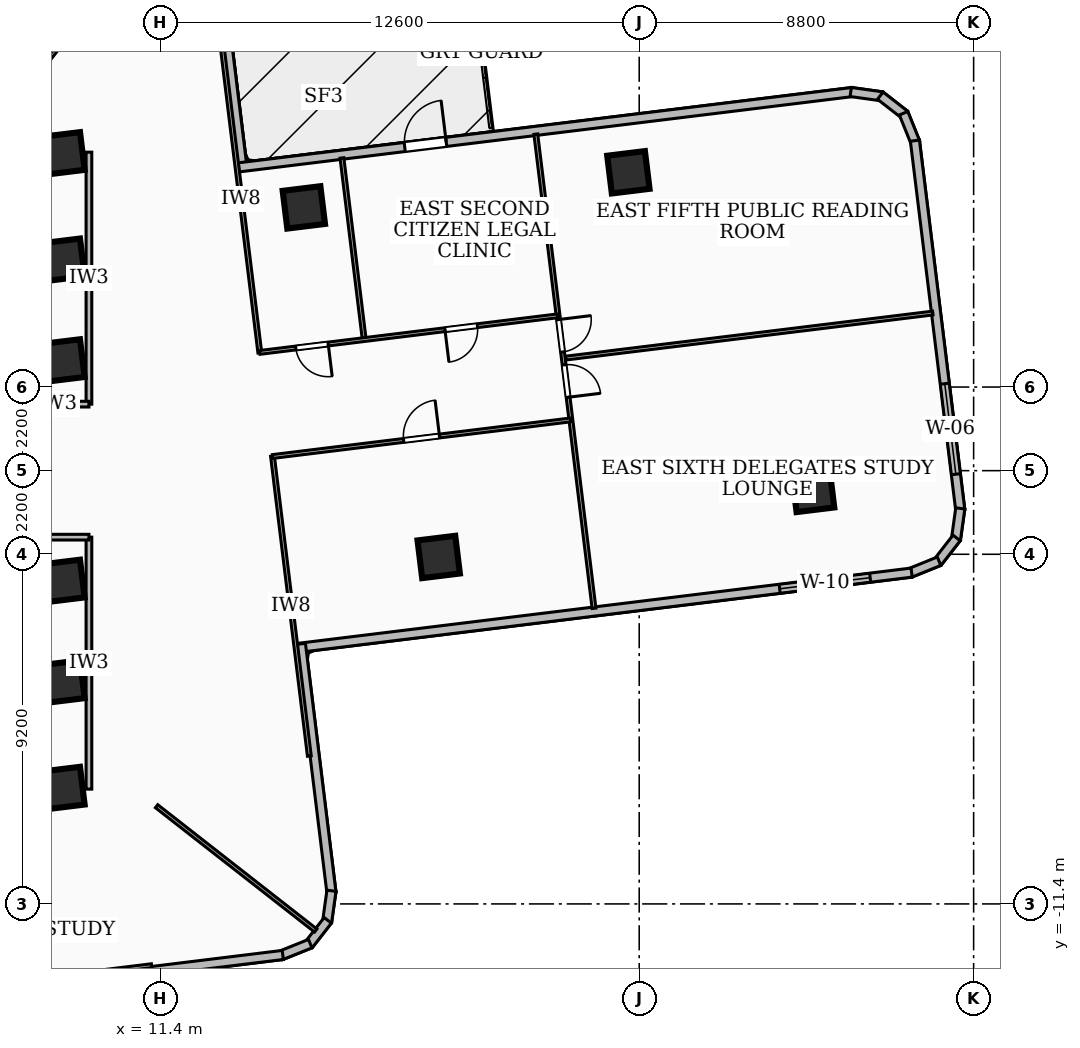
"""IFC4 building model, lengths in metres.
Left out: names, types, materials, properties, quantities, classifications, styles, units other than length and angle.
Written with IfcOpenShell. Run it as: python <this file> out.ifc"""

import sys

from ifc_helpers import new_model, si_unit, direction, frame, frame_2d, origin, origin_2d, place, context, subcontext, project, spatial, rectangle, extrude, element, fill, save


model = new_model("IFC4")
c1 = context("Model", 3, precision=1e-05, world=origin(), true_north=direction((0.0, 1.0)))
c2 = subcontext(c1, "Body", "Model", "MODEL_VIEW")
j1 = project(units=[si_unit("LENGTHUNIT", "METRE"), si_unit("PLANEANGLEUNIT", "RADIAN")], contexts=[c1])
p1 = place(None, origin())
s1 = spatial("IfcSite", under=j1, at=p1, CompositionType="ELEMENT")
p2 = place(p1, origin())
s2 = spatial("IfcBuilding", under=s1, at=p2, CompositionType="ELEMENT")
p3 = place(p2, frame((0.0, 0.0, 78.48)))
s3 = spatial("IfcBuildingStorey", under=s2, at=p3, CompositionType="ELEMENT", Elevation=78.48)
for number, where, z_axis, x_axis in (
    (1, (-8.78, 8.56, 0.0), (0.0, 0.0, 1.0), (1.0, 0.0, 0.0)),
    (2, (8.78, -8.56, 0.0), (0.0, 0.0, 1.0), (-1.0, 0.0, 0.0)),
):
    element("IfcWall", number, at=place(p3, frame(where, z_axis=z_axis, x_axis=x_axis)), inside=s3, PredefinedType="SHEAR", context=c2, shape_type="SweptSolid", body=[
        extrude(rectangle(XDim=17.56, YDim=0.5, at=frame_2d((8.78, 0.0))), origin(), (0.0, 0.0, 1.0), 3.34),
    ])
for number, where, z_axis, x_axis in (
    (3, (8.85, -5.55, 0.0), (0.0, 0.0, 1.0), (0.993, 0.122, 0.0)),
    (4, (8.85, -2.9, 0.0), (0.0, 0.0, 1.0), (0.993, 0.122, 0.0)),
    (5, (8.85, 2.9, 0.0), (0.0, 0.0, 1.0), (0.993, 0.122, 0.0)),
    (6, (8.85, 5.55, 0.0), (0.0, 0.0, 1.0), (0.993, 0.122, 0.0)),
    (7, (8.85, -8.35, 0.0), (0.0, 0.0, 1.0), (0.993, 0.122, 0.0)),
    (8, (8.85, 8.35, 0.0), (0.0, 0.0, 1.0), (0.993, 0.122, 0.0)),
    (9, (18.724, -2.271, 0.0), (0.0, 0.0, 1.0), (0.993, 0.122, 0.0)),
    (10, (15.175, 6.927, 0.0), (0.0, 0.0, 1.0), (0.993, 0.122, 0.0)),
    (11, (28.576, -0.533, 0.0), (0.0, 0.0, 1.0), (0.993, 0.122, 0.0)),
    (12, (23.715, 7.851, 0.0), (0.0, 0.0, 1.0), (0.993, 0.122, 0.0)),
):
    element("IfcColumn", number, at=place(p3, frame(where, z_axis=z_axis, x_axis=x_axis)), inside=s3, PredefinedType="COLUMN", context=c2, shape_type="SweptSolid", body=[
        extrude(rectangle(XDim=1.0, YDim=1.0, at=origin_2d()), origin(), (0.0, 0.0, 1.0), 3.6),
    ])
p4 = place(p3, frame((12.743, 14.621, 0.0), z_axis=(0.0, 0.0, 1.0), x_axis=(0.121949848087, -0.992536263595, 0.0)))
e13 = element("IfcWall", 13, at=p4, inside=s3, PredefinedType="SOLIDWALL", context=c2, shape_type="SweptSolid", body=[
    extrude(rectangle(XDim=6.775, YDim=0.24, at=frame_2d((3.387, 0.0))), origin(), (0.0, 0.0, 1.0), 2.644),
])
p5 = place(p3, frame((13.462, 7.98, 0.0), z_axis=(0.0, 0.0, 1.0), x_axis=(0.992550299081, 0.121835560463, 0.0)))
e14 = element("IfcWall", 14, at=p5, inside=s3, PredefinedType="SOLIDWALL", context=c2, shape_type="SweptSolid", body=[
    extrude(rectangle(XDim=16.275, YDim=0.24, at=frame_2d((8.138, 0.0))), origin(), (0.0, 0.0, 1.0), 2.644),
])
p6 = place(p5, frame((4.4, 0.0, 0.0)))
e15 = element("IfcOpeningElement", 15, at=p6, cuts=e14, PredefinedType="OPENING", context=c2, shape_type="SweptSolid", body=[
    extrude(rectangle(XDim=1.1, YDim=2.1, at=frame_2d((0.55, 1.05))), frame((0.0, 0.13, 0.0), z_axis=(0.0, -1.0, 0.0), x_axis=(1.0, 0.0, 0.0)), (0.0, 0.0, 1.0), 0.26),
])
p7 = place(p3, frame((29.566, 9.963, 0.0), z_axis=(0.0, 0.0, 1.0), x_axis=(0.990579937989, -0.136935701899, 0.0)))
e16 = element("IfcWall", 16, at=p7, inside=s3, PredefinedType="SOLIDWALL", context=c2, shape_type="SweptSolid", body=[
    extrude(rectangle(XDim=0.831, YDim=0.24, at=frame_2d((0.416, 0.0))), origin(), (0.0, 0.0, 1.0), 3.34),
])
p8 = place(p3, frame((30.344, 9.867, 0.0), z_axis=(0.0, 0.0, 1.0), x_axis=(0.788996702001, -0.614397431824, 0.0)))
e17 = element("IfcWall", 17, at=p8, inside=s3, PredefinedType="SOLIDWALL", context=c2, shape_type="SweptSolid", body=[
    extrude(rectangle(XDim=0.814, YDim=0.24, at=frame_2d((0.407, 0.0))), origin(), (0.0, 0.0, 1.0), 3.34),
])
p9 = place(p3, frame((30.957, 9.405, 0.0), z_axis=(0.0, 0.0, 1.0), x_axis=(0.373519459995, -0.927622343955, 0.0)))
e18 = element("IfcWall", 18, at=p9, inside=s3, PredefinedType="SOLIDWALL", context=c2, shape_type="SweptSolid", body=[
    extrude(rectangle(XDim=0.83, YDim=0.24, at=frame_2d((0.415, 0.0))), origin(), (0.0, 0.0, 1.0), 3.34),
])
p10 = place(p3, frame((31.255, 8.683, 0.0), z_axis=(0.0, 0.0, 1.0), x_axis=(0.12185728374, -0.992547632308, 0.0)))
e19 = element("IfcWall", 19, at=p10, inside=s3, PredefinedType="SOLIDWALL", context=c2, shape_type="SweptSolid", body=[
    extrude(rectangle(XDim=9.799, YDim=0.24, at=frame_2d((4.899, 0.0))), origin(), (0.0, 0.0, 1.0), 3.34),
])
p11 = place(p10, frame((6.443, 0.0, 0.85)))
e20 = element("IfcOpeningElement", 20, at=p11, cuts=e19, PredefinedType="OPENING", context=c2, shape_type="SweptSolid", body=[
    extrude(rectangle(XDim=2.4, YDim=1.85, at=frame_2d((1.2, 0.925))), frame((0.0, 0.13, 0.0), z_axis=(0.0, -1.0, 0.0), x_axis=(1.0, 0.0, 0.0)), (0.0, 0.0, 1.0), 0.26),
])
p12 = place(p3, frame((32.449, -0.993, 0.0), z_axis=(0.0, 0.0, 1.0), x_axis=(-0.138538220487, -0.990357087855, 0.0)))
e21 = element("IfcWall", 21, at=p12, inside=s3, PredefinedType="SOLIDWALL", context=c2, shape_type="SweptSolid", body=[
    extrude(rectangle(XDim=0.83, YDim=0.24, at=frame_2d((0.415, 0.0))), origin(), (0.0, 0.0, 1.0), 3.34),
])
p13 = place(p3, frame((32.352, -1.77, 0.0), z_axis=(0.0, 0.0, 1.0), x_axis=(-0.614397431824, -0.788996702001, 0.0)))
e22 = element("IfcWall", 22, at=p13, inside=s3, PredefinedType="SOLIDWALL", context=c2, shape_type="SweptSolid", body=[
    extrude(rectangle(XDim=0.814, YDim=0.24, at=frame_2d((0.407, 0.0))), origin(), (0.0, 0.0, 1.0), 3.34),
])
p14 = place(p3, frame((31.89, -2.383, 0.0), z_axis=(0.0, 0.0, 1.0), x_axis=(-0.927007742151, -0.375042192283, 0.0)))
e23 = element("IfcWall", 23, at=p14, inside=s3, PredefinedType="SOLIDWALL", context=c2, shape_type="SweptSolid", body=[
    extrude(rectangle(XDim=0.829, YDim=0.24, at=frame_2d((0.415, 0.0))), origin(), (0.0, 0.0, 1.0), 3.34),
])
p15 = place(p3, frame((31.169, -2.682, 0.0), z_axis=(0.0, 0.0, 1.0), x_axis=(-0.992548484973, -0.121850338438, 0.0)))
e24 = element("IfcWall", 24, at=p15, inside=s3, PredefinedType="SOLIDWALL", context=c2, shape_type="SweptSolid", body=[
    extrude(rectangle(XDim=16.275, YDim=0.24, at=frame_2d((8.138, 0.0))), origin(), (0.0, 0.0, 1.0), 3.34),
])
p16 = place(p15, frame((1.1, 0.0, 0.85)))
e25 = element("IfcOpeningElement", 25, at=p16, cuts=e24, PredefinedType="OPENING", context=c2, shape_type="SweptSolid", body=[
    extrude(rectangle(XDim=2.4, YDim=1.65, at=frame_2d((1.2, 0.825))), frame((0.0, 0.13, 0.0), z_axis=(0.0, -1.0, 0.0), x_axis=(1.0, 0.0, 0.0)), (0.0, 0.0, 1.0), 0.26),
])
p17 = place(p3, frame((15.098, -4.558, 0.0), z_axis=(0.0, 0.0, 1.0), x_axis=(0.121938646341, -0.992537639855, 0.0)))
e26 = element("IfcWall", 26, at=p17, inside=s3, PredefinedType="SOLIDWALL", context=c2, shape_type="SweptSolid", body=[
    extrude(rectangle(XDim=6.595, YDim=0.24, at=frame_2d((3.298, 0.0))), origin(), (0.0, 0.0, 1.0), 3.34),
])
p18 = place(p3, frame((15.902, -11.054, 0.0), z_axis=(0.0, 0.0, 1.0), x_axis=(-0.138376981782, -0.990379629694, 0.0)))
e27 = element("IfcWall", 27, at=p18, inside=s3, PredefinedType="SOLIDWALL", context=c2, shape_type="SweptSolid", body=[
    extrude(rectangle(XDim=0.831, YDim=0.24, at=frame_2d((0.416, 0.0))), origin(), (0.0, 0.0, 1.0), 3.34),
])
p19 = place(p3, frame((15.805, -11.832, 0.0), z_axis=(0.0, 0.0, 1.0), x_axis=(-0.614397431824, -0.788996702001, 0.0)))
e28 = element("IfcWall", 28, at=p19, inside=s3, PredefinedType="SOLIDWALL", context=c2, shape_type="SweptSolid", body=[
    extrude(rectangle(XDim=0.814, YDim=0.24, at=frame_2d((0.407, 0.0))), origin(), (0.0, 0.0, 1.0), 3.34),
])
p20 = place(p3, frame((15.343, -12.445, 0.0), z_axis=(0.0, 0.0, 1.0), x_axis=(-0.927724225254, -0.37326634174, 0.0)))
e29 = element("IfcWall", 29, at=p20, inside=s3, PredefinedType="SOLIDWALL", context=c2, shape_type="SweptSolid", body=[
    extrude(rectangle(XDim=0.83, YDim=0.24, at=frame_2d((0.415, 0.0))), origin(), (0.0, 0.0, 1.0), 3.34),
])
p21 = place(p3, frame((14.621, -12.743, 0.0), z_axis=(0.0, 0.0, 1.0), x_axis=(-0.992536263595, -0.121949848087, 0.0)))
e30 = element("IfcWall", 30, at=p21, inside=s3, PredefinedType="SOLIDWALL", context=c2, shape_type="SweptSolid", body=[
    extrude(rectangle(XDim=6.775, YDim=0.24, at=frame_2d((3.387, 0.0))), origin(), (0.0, 0.0, 1.0), 3.34),
])
p22 = place(p3, frame((9.52, 1.75, 0.0), z_axis=(0.0, 0.0, 1.0), x_axis=(0.0, 1.0, 0.0)))
e31 = element("IfcWall", 31, at=p22, inside=s3, PredefinedType="PARTITIONING", context=c2, shape_type="SweptSolid", body=[
    extrude(rectangle(XDim=6.63, YDim=0.15, at=frame_2d((3.315, 0.0))), origin(), (0.0, 0.0, 1.0), 2.486),
])
p23 = place(p3, frame((7.85, 1.75, 0.0), z_axis=(0.0, 0.0, 1.0), x_axis=(1.0, 0.0, 0.0)))
e32 = element("IfcWall", 32, at=p23, inside=s3, PredefinedType="PARTITIONING", context=c2, shape_type="SweptSolid", body=[
    extrude(rectangle(XDim=1.67, YDim=0.15, at=frame_2d((0.835, 0.0))), origin(), (0.0, 0.0, 1.0), 2.405),
])
p24 = place(p3, frame((9.52, -8.38, 0.0), z_axis=(0.0, 0.0, 1.0), x_axis=(0.0, 1.0, 0.0)))
e33 = element("IfcWall", 33, at=p24, inside=s3, PredefinedType="PARTITIONING", context=c2, shape_type="SweptSolid", body=[
    extrude(rectangle(XDim=6.63, YDim=0.15, at=frame_2d((3.315, 0.0))), origin(), (0.0, 0.0, 1.0), 2.486),
])
p25 = place(p3, frame((7.85, -1.75, 0.0), z_axis=(0.0, 0.0, 1.0), x_axis=(1.0, 0.0, 0.0)))
e34 = element("IfcWall", 34, at=p25, inside=s3, PredefinedType="PARTITIONING", context=c2, shape_type="SweptSolid", body=[
    extrude(rectangle(XDim=1.67, YDim=0.15, at=frame_2d((0.835, 0.0))), origin(), (0.0, 0.0, 1.0), 2.405),
])
p26 = place(p3, frame((8.11, 10.38, 0.0), z_axis=(0.0, 0.0, 1.0), x_axis=(0.615665236773, 0.788007814828, 0.0)))
e35 = element("IfcWall", 35, at=p26, inside=s3, PredefinedType="PARTITIONING", context=c2, shape_type="SweptSolid", body=[
    extrude(rectangle(XDim=6.482, YDim=0.1, at=frame_2d((3.241, 0.0))), origin(), (0.0, 0.0, 1.0), 2.644),
])
p27 = place(p3, frame((11.3, -8.829, 0.0), z_axis=(0.0, 0.0, 1.0), x_axis=(0.788014623364, -0.61565652223, 0.0)))
e36 = element("IfcWall", 36, at=p27, inside=s3, PredefinedType="PARTITIONING", context=c2, shape_type="SweptSolid", body=[
    extrude(rectangle(XDim=5.315, YDim=0.1, at=frame_2d((2.657, 0.0))), origin(), (0.0, 0.0, 1.0), 3.34),
])
p28 = place(p3, frame((14.017, 3.101, 0.0), z_axis=(0.0, 0.0, 1.0), x_axis=(-0.122045971517, 0.992524448483, 0.0)))
e37 = element("IfcWall", 37, at=p28, inside=s3, PredefinedType="PARTITIONING", context=c2, shape_type="SweptSolid", body=[
    extrude(rectangle(XDim=8.13, YDim=0.1, at=frame_2d((4.065, 0.0))), origin(), (0.0, 0.0, 1.0), 2.486),
])
p29 = place(p3, frame((15.32, -7.509, 0.0), z_axis=(0.0, 0.0, 1.0), x_axis=(-0.122001160868, 0.992529957607, 0.0)))
e38 = element("IfcWall", 38, at=p29, inside=s3, PredefinedType="PARTITIONING", context=c2, shape_type="SweptSolid", body=[
    extrude(rectangle(XDim=7.95, YDim=0.1, at=frame_2d((3.975, 0.0))), origin(), (0.0, 0.0, 1.0), 2.486),
])
p30 = place(p3, frame((16.762, 3.469, 0.0), z_axis=(0.0, 0.0, 1.0), x_axis=(-0.121797137196, 0.992555014783, 0.0)))
e39 = element("IfcWall", 39, at=p30, inside=s3, PredefinedType="PARTITIONING", context=c2, shape_type="SweptSolid", body=[
    extrude(rectangle(XDim=4.795, YDim=0.1, at=frame_2d((2.397, 0.0))), origin(), (0.0, 0.0, 1.0), 2.486),
])
p31 = place(p3, frame((21.866, 4.075, 0.0), z_axis=(0.0, 0.0, 1.0), x_axis=(-0.992548040298, -0.121853960542, 0.0)))
e40 = element("IfcWall", 40, at=p31, inside=s3, PredefinedType="PARTITIONING", context=c2, shape_type="SweptSolid", body=[
    extrude(rectangle(XDim=7.91, YDim=0.1, at=frame_2d((3.955, 0.0))), origin(), (0.0, 0.0, 1.0), 3.34),
])
p32 = place(p31, frame((6.095, 0.0, 0.0)))
e41 = element("IfcOpeningElement", 41, at=p32, cuts=e40, PredefinedType="OPENING", context=c2, shape_type="SweptSolid", body=[
    extrude(rectangle(XDim=0.86, YDim=2.04, at=frame_2d((0.43, 1.02))), frame((0.0, 0.06, 0.0), z_axis=(0.0, -1.0, 0.0), x_axis=(1.0, 0.0, 0.0)), (0.0, 0.0, 1.0), 0.12),
])
p33 = place(p31, frame((2.14, 0.0, 0.0)))
e42 = element("IfcOpeningElement", 42, at=p33, cuts=e40, PredefinedType="OPENING", context=c2, shape_type="SweptSolid", body=[
    extrude(rectangle(XDim=0.86, YDim=2.04, at=frame_2d((0.43, 1.02))), frame((0.0, 0.06, 0.0), z_axis=(0.0, -1.0, 0.0), x_axis=(1.0, 0.0, 0.0)), (0.0, 0.0, 1.0), 0.12),
])
p34 = place(p3, frame((14.352, 0.372, 0.0), z_axis=(0.0, 0.0, 1.0), x_axis=(0.992547581986, 0.121857693618, 0.0)))
e43 = element("IfcWall", 43, at=p34, inside=s3, PredefinedType="PARTITIONING", context=c2, shape_type="SweptSolid", body=[
    extrude(rectangle(XDim=7.91, YDim=0.1, at=frame_2d((3.955, 0.0))), origin(), (0.0, 0.0, 1.0), 3.34),
])
p35 = place(p34, frame((3.475, 0.0, 0.0)))
e44 = element("IfcOpeningElement", 44, at=p35, cuts=e43, PredefinedType="OPENING", context=c2, shape_type="SweptSolid", body=[
    extrude(rectangle(XDim=0.95, YDim=2.08, at=frame_2d((0.475, 1.04))), frame((0.0, 0.06, 0.0), z_axis=(0.0, -1.0, 0.0), x_axis=(1.0, 0.0, 0.0)), (0.0, 0.0, 1.0), 0.12),
])
p36 = place(p3, frame((22.064, 2.961, 0.0), z_axis=(0.0, 0.0, 1.0), x_axis=(0.992550160931, 0.121836685916, 0.0)))
e45 = element("IfcWall", 45, at=p36, inside=s3, PredefinedType="PARTITIONING", context=c2, shape_type="SweptSolid", body=[
    extrude(rectangle(XDim=9.735, YDim=0.1, at=frame_2d((4.867, 0.0))), origin(), (0.0, 0.0, 1.0), 2.793),
])
p37 = place(p3, frame((21.279, 8.854, 0.0), z_axis=(0.0, 0.0, 1.0), x_axis=(0.121878209661, -0.992545062962, 0.0)))
e46 = element("IfcWall", 46, at=p37, inside=s3, PredefinedType="PARTITIONING", context=c2, shape_type="SweptSolid", body=[
    extrude(rectangle(XDim=12.57, YDim=0.1, at=frame_2d((6.285, 0.0))), origin(), (0.0, 0.0, 1.0), 2.486),
])
p38 = place(p37, frame((6.115, 0.0, 0.0)))
e47 = element("IfcOpeningElement", 47, at=p38, cuts=e46, PredefinedType="OPENING", context=c2, shape_type="SweptSolid", body=[
    extrude(rectangle(XDim=0.86, YDim=2.04, at=frame_2d((0.43, 1.02))), frame((0.0, 0.06, 0.0), z_axis=(0.0, -1.0, 0.0), x_axis=(1.0, 0.0, 0.0)), (0.0, 0.0, 1.0), 0.12),
])
p39 = place(p37, frame((4.915, 0.0, 0.0)))
e48 = element("IfcOpeningElement", 48, at=p39, cuts=e46, PredefinedType="OPENING", context=c2, shape_type="SweptSolid", body=[
    extrude(rectangle(XDim=0.86, YDim=2.04, at=frame_2d((0.43, 1.02))), frame((0.0, 0.06, 0.0), z_axis=(0.0, -1.0, 0.0), x_axis=(1.0, 0.0, 0.0)), (0.0, 0.0, 1.0), 0.12),
])
p40 = place(p3, frame((3.101, -14.017, 0.0), z_axis=(0.0, 0.0, 1.0), x_axis=(0.992524448483, 0.122045971517, 0.0)))
e49 = element("IfcWall", 49, at=p40, inside=s3, PredefinedType="PARTITIONING", context=c2, shape_type="SweptSolid", body=[
    extrude(rectangle(XDim=8.13, YDim=0.1, at=frame_2d((4.065, 0.0))), origin(), (0.0, 0.0, 1.0), 2.486),
])
p41 = place(p6, origin())
e50 = element("IfcDoor", 50, at=p41, inside=s3, OperationType="SINGLE_SWING_RIGHT", PredefinedType="DOOR", context=c2, shape_type="SweptSolid", body=[
    extrude(rectangle(XDim=1.1, YDim=2.1, at=frame_2d((0.55, 1.05))), frame((0.0, 0.025, 0.0), z_axis=(0.0, -1.0, 0.0), x_axis=(1.0, 0.0, 0.0)), (0.0, 0.0, 1.0), 0.05),
])
fill(e15, e50)
p42 = place(p11, origin())
e51 = element("IfcWindow", 51, at=p42, inside=s3, PartitioningType="SINGLE_PANEL", PredefinedType="WINDOW", context=c2, shape_type="SweptSolid", body=[
    extrude(rectangle(XDim=2.4, YDim=1.85, at=frame_2d((1.2, 0.925))), frame((0.0, 0.03, 0.0), z_axis=(0.0, -1.0, 0.0), x_axis=(1.0, 0.0, 0.0)), (0.0, 0.0, 1.0), 0.06),
])
fill(e20, e51)
p43 = place(p16, origin())
e52 = element("IfcWindow", 52, at=p43, inside=s3, PartitioningType="SINGLE_PANEL", PredefinedType="WINDOW", context=c2, shape_type="SweptSolid", body=[
    extrude(rectangle(XDim=2.4, YDim=1.65, at=frame_2d((1.2, 0.825))), frame((0.0, 0.03, 0.0), z_axis=(0.0, -1.0, 0.0), x_axis=(1.0, 0.0, 0.0)), (0.0, 0.0, 1.0), 0.06),
])
fill(e25, e52)
p44 = place(p32, origin())
e53 = element("IfcDoor", 53, at=p44, inside=s3, OperationType="SINGLE_SWING_LEFT", PredefinedType="DOOR", context=c2, shape_type="SweptSolid", body=[
    extrude(rectangle(XDim=0.86, YDim=2.04, at=frame_2d((0.43, 1.02))), frame((0.0, 0.025, 0.0), z_axis=(0.0, -1.0, 0.0), x_axis=(1.0, 0.0, 0.0)), (0.0, 0.0, 1.0), 0.05),
])
fill(e41, e53)
p45 = place(p33, origin())
e54 = element("IfcDoor", 54, at=p45, inside=s3, OperationType="SINGLE_SWING_RIGHT", PredefinedType="DOOR", context=c2, shape_type="SweptSolid", body=[
    extrude(rectangle(XDim=0.86, YDim=2.04, at=frame_2d((0.43, 1.02))), frame((0.0, 0.025, 0.0), z_axis=(0.0, -1.0, 0.0), x_axis=(1.0, 0.0, 0.0)), (0.0, 0.0, 1.0), 0.05),
])
fill(e42, e54)
p46 = place(p35, origin())
e55 = element("IfcDoor", 55, at=p46, inside=s3, OperationType="SINGLE_SWING_RIGHT", PredefinedType="DOOR", context=c2, shape_type="SweptSolid", body=[
    extrude(rectangle(XDim=0.95, YDim=2.08, at=frame_2d((0.475, 1.04))), frame((0.0, 0.025, 0.0), z_axis=(0.0, -1.0, 0.0), x_axis=(1.0, 0.0, 0.0)), (0.0, 0.0, 1.0), 0.05),
])
fill(e44, e55)
p47 = place(p38, origin())
e56 = element("IfcDoor", 56, at=p47, inside=s3, OperationType="SINGLE_SWING_RIGHT", PredefinedType="DOOR", context=c2, shape_type="SweptSolid", body=[
    extrude(rectangle(XDim=0.86, YDim=2.04, at=frame_2d((0.43, 1.02))), frame((0.0, 0.025, 0.0), z_axis=(0.0, -1.0, 0.0), x_axis=(1.0, 0.0, 0.0)), (0.0, 0.0, 1.0), 0.05),
])
fill(e47, e56)
p48 = place(p39, origin())
e57 = element("IfcDoor", 57, at=p48, inside=s3, OperationType="SINGLE_SWING_LEFT", PredefinedType="DOOR", context=c2, shape_type="SweptSolid", body=[
    extrude(rectangle(XDim=0.86, YDim=2.04, at=frame_2d((0.43, 1.02))), frame((0.0, 0.025, 0.0), z_axis=(0.0, -1.0, 0.0), x_axis=(1.0, 0.0, 0.0)), (0.0, 0.0, 1.0), 0.05),
])
fill(e48, e57)
save(model, sys.argv[1])
